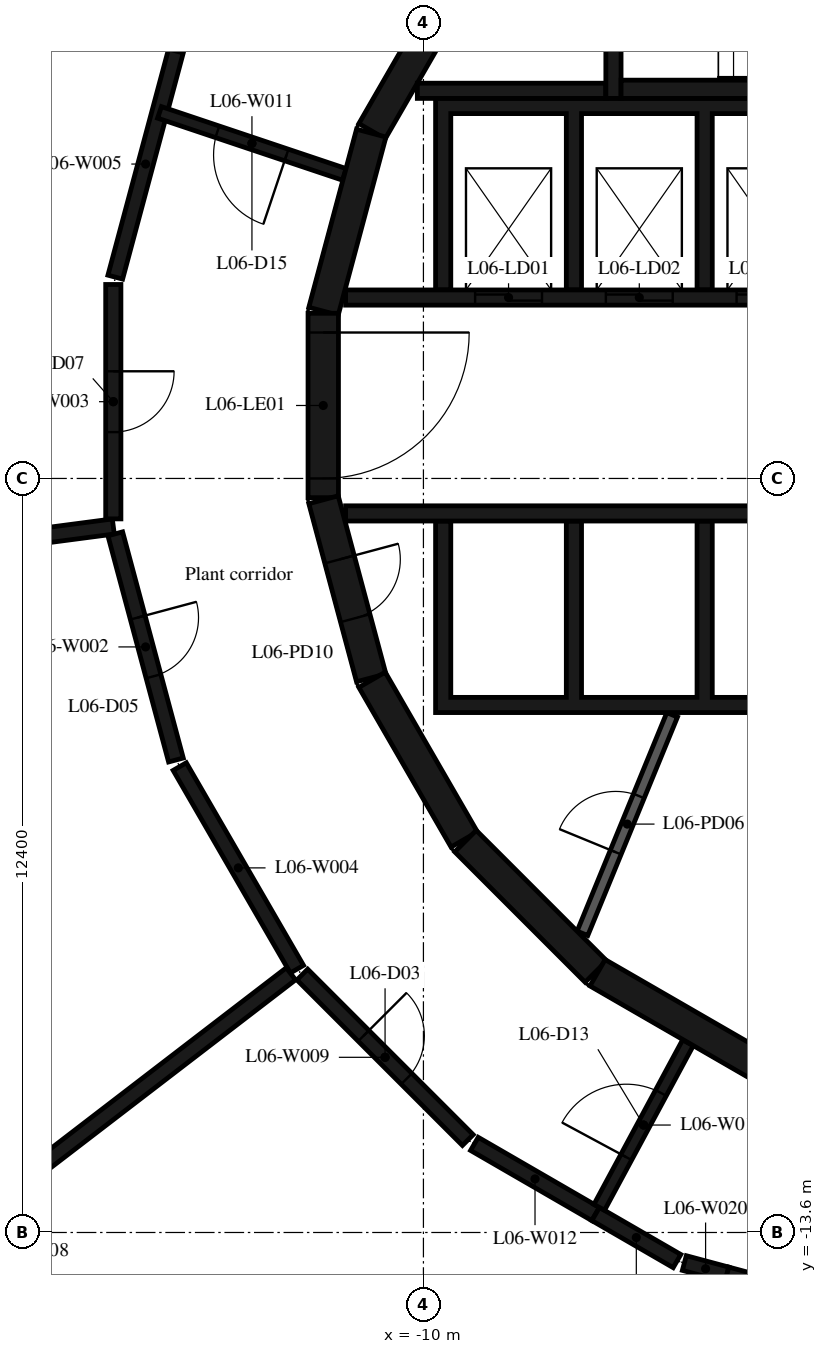
"""IFC4 building model, lengths in metres.
Left out: names, types, materials, properties, quantities, classifications, styles, units other than length and angle.
Written with IfcOpenShell. Run it as: python <this file> out.ifc"""

import sys

from ifc_helpers import new_model, si_unit, direction, frame, frame_2d, origin, place, context, subcontext, project, spatial, polyline, rectangle, outline, extrude, element, fill, save


model = new_model("IFC4")
c1 = context("Model", 3, precision=1e-05, world=origin(), true_north=direction((0.0, 1.0)))
c2 = subcontext(c1, "Body", "Model", "MODEL_VIEW")
j1 = project(units=[si_unit("LENGTHUNIT", "METRE"), si_unit("PLANEANGLEUNIT", "RADIAN")], contexts=[c1])
p1 = place(None, origin())
s1 = spatial("IfcSite", under=j1, at=p1, CompositionType="ELEMENT")
p2 = place(p1, origin())
s2 = spatial("IfcBuilding", under=s1, at=p2, CompositionType="ELEMENT")
p3 = place(p2, frame((0.0, 0.0, 33.0)))
s3 = spatial("IfcBuildingStorey", under=s2, at=p3, CompositionType="ELEMENT", Elevation=33.0)
for number, where, z_axis, x_axis in (
    (1, (-9.329, 7.137, 0.0), (0.0, 0.0, 1.0), (-0.5, -0.866, 0.0)),
    (2, (-10.858, 4.479, 0.0), (0.0, 0.0, 1.0), (-0.259, -0.966, 0.0)),
):
    element("IfcWall", number, at=place(p3, frame(where, z_axis=z_axis, x_axis=x_axis)), inside=s3, PredefinedType="SHEAR", context=c2, shape_type="SweptSolid", body=[
        extrude(rectangle(XDim=3.033, YDim=0.5, at=frame_2d((1.516, 0.0))), origin(), (0.0, 0.0, 1.0), 4.95),
    ])
p4 = place(p3, frame((-11.647, 1.516, 0.0), z_axis=(0.0, 0.0, 1.0), x_axis=(0.0, -1.0, 0.0)))
e3 = element("IfcWall", 3, at=p4, inside=s3, PredefinedType="SHEAR", context=c2, shape_type="SweptSolid", body=[
    extrude(rectangle(XDim=3.033, YDim=0.5, at=frame_2d((1.516, 0.0))), origin(), (0.0, 0.0, 1.0), 4.95),
])
p5 = place(p4, frame((0.316, 0.0, 0.0)))
e4 = element("IfcOpeningElement", 4, at=p5, cuts=e3, PredefinedType="OPENING", context=c2, shape_type="SweptSolid", body=[
    extrude(rectangle(XDim=2.4, YDim=2.1, at=frame_2d((1.2, 1.05))), frame((0.0, 0.26, 0.0), z_axis=(0.0, -1.0, 0.0), x_axis=(1.0, 0.0, 0.0)), (0.0, 0.0, 1.0), 0.52),
])
p6 = place(p3, frame((-11.643, -1.55, 0.0), z_axis=(0.0, 0.0, 1.0), x_axis=(0.258734743916, -0.965948410781, 0.0)))
e5 = element("IfcWall", 5, at=p6, inside=s3, PredefinedType="SHEAR", context=c2, shape_type="SweptSolid", body=[
    extrude(rectangle(XDim=3.033, YDim=0.5, at=frame_2d((1.516, 0.0))), origin(), (0.0, 0.0, 1.0), 4.95),
])
p7 = place(p6, frame((1.016, 0.0, 0.0)))
e6 = element("IfcOpeningElement", 6, at=p7, cuts=e5, PredefinedType="OPENING", context=c2, shape_type="SweptSolid", body=[
    extrude(rectangle(XDim=1.0, YDim=2.4, at=frame_2d((0.5, 1.2))), frame((0.0, 0.26, 0.0), z_axis=(0.0, -1.0, 0.0), x_axis=(1.0, 0.0, 0.0)), (0.0, 0.0, 1.0), 0.52),
])
p8 = place(p3, frame((-10.845, -4.51, 0.0), z_axis=(0.0, 0.0, 1.0), x_axis=(0.500087131594, -0.865975092491, 0.0)))
e7 = element("IfcWall", 7, at=p8, inside=s3, PredefinedType="SHEAR", context=c2, shape_type="SweptSolid", body=[
    extrude(rectangle(XDim=3.033, YDim=0.5, at=frame_2d((1.516, 0.0))), origin(), (0.0, 0.0, 1.0), 4.95),
])
p9 = place(p3, frame((-9.308, -7.164, 0.0), z_axis=(0.0, 0.0, 1.0), x_axis=(0.707106781187, -0.707106781187, 0.0)))
e8 = element("IfcWall", 8, at=p9, inside=s3, PredefinedType="SHEAR", context=c2, shape_type="SweptSolid", body=[
    extrude(rectangle(XDim=3.032, YDim=0.5, at=frame_2d((1.516, 0.0))), origin(), (0.0, 0.0, 1.0), 4.95),
])
p10 = place(p3, frame((-7.137, -9.329, 0.0), z_axis=(0.0, 0.0, 1.0), x_axis=(0.865975092491, -0.500087131594, 0.0)))
e9 = element("IfcWall", 9, at=p10, inside=s3, PredefinedType="SHEAR", context=c2, shape_type="SweptSolid", body=[
    extrude(rectangle(XDim=3.033, YDim=0.5, at=frame_2d((1.516, 0.0))), origin(), (0.0, 0.0, 1.0), 4.95),
])
p11 = place(p3, frame((-6.75, 5.2, 0.0), z_axis=(0.0, 0.0, 1.0), x_axis=(1.0, 0.0, 0.0)))
e10 = element("IfcWall", 10, at=p11, inside=s3, PredefinedType="SHEAR", context=c2, shape_type="SweptSolid", body=[
    extrude(rectangle(XDim=6.75, YDim=0.3, at=frame_2d((3.375, 0.0))), origin(), (0.0, 0.0, 1.0), 4.95),
])
p12 = place(p3, frame((-6.875, 8.97, 0.0), z_axis=(0.0, 0.0, 1.0), x_axis=(0.0, -1.0, 0.0)))
e11 = element("IfcWall", 11, at=p12, inside=s3, PredefinedType="SHEAR", context=c2, shape_type="SweptSolid", body=[
    extrude(rectangle(XDim=3.92, YDim=0.25, at=frame_2d((1.96, 0.0))), origin(), (0.0, 0.0, 1.0), 4.95),
])
p13 = place(p12, frame((1.61, 0.0, 0.0)))
e12 = element("IfcOpeningElement", 12, at=p13, cuts=e11, PredefinedType="OPENING", context=c2, shape_type="SweptSolid", body=[
    extrude(rectangle(XDim=1.2, YDim=2.1, at=frame_2d((0.6, 1.05))), frame((0.0, 0.135, 0.0), z_axis=(0.0, -1.0, 0.0), x_axis=(1.0, 0.0, 0.0)), (0.0, 0.0, 1.0), 0.27),
])
p14 = place(p3, frame((-7.0, 5.175, 0.0), z_axis=(0.0, 0.0, 1.0), x_axis=(-1.0, 0.0, 0.0)))
e13 = element("IfcWall", 13, at=p14, inside=s3, PredefinedType="SHEAR", context=c2, shape_type="SweptSolid", body=[
    extrude(rectangle(XDim=3.1, YDim=0.25, at=frame_2d((1.55, 0.0))), origin(), (0.0, 0.0, 1.0), 4.95),
])
p15 = place(p3, origin())
e14 = element("IfcWall", 14, at=p15, inside=s3, PredefinedType="SHEAR", context=c2, shape_type="SweptSolid", body=[
    extrude(outline(polyline([(-9.55, 4.8), (-7.65, 4.8), (-7.65, 1.9), (-7.4, 1.9), (-7.4, 4.8), (-5.5, 4.8), (-5.5, 1.9), (-5.25, 1.9), (-5.25, 4.8), (-3.35, 4.8), (-3.35, 1.9), (-3.1, 1.9), (-3.1, 4.8), (-1.2, 4.8), (-1.2, 1.9), (-0.95, 1.9), (-0.95, 4.8), (3.1, 4.8), (3.1, 1.9), (3.35, 1.9), (3.35, 4.8), (5.25, 4.8), (5.25, 1.9), (5.5, 1.9), (5.5, 4.8), (7.4, 4.8), (7.4, 1.9), (7.65, 1.9), (7.65, 4.8), (9.55, 4.8), (9.55, 1.9), (9.8, 1.9), (9.8, 4.8), (9.8, 5.05), (-9.8, 5.05), (-9.8, 4.8), (-9.8, 1.9), (-9.55, 1.9), (-9.55, 4.8)])), origin(), (0.0, 0.0, 1.0), 4.95),
])
p16 = place(p3, origin())
e15 = element("IfcWall", 15, at=p16, inside=s3, PredefinedType="SHEAR", context=c2, shape_type="SweptSolid", body=[
    extrude(outline(polyline([(9.8, -5.05), (9.8, -4.8), (9.8, -1.9), (9.55, -1.9), (9.55, -4.8), (7.65, -4.8), (7.65, -1.9), (7.4, -1.9), (7.4, -4.8), (5.5, -4.8), (5.5, -1.9), (5.25, -1.9), (5.25, -4.8), (3.35, -4.8), (3.35, -1.9), (3.1, -1.9), (3.1, -4.8), (1.2, -4.8), (1.2, -1.9), (0.95, -1.9), (0.95, -4.8), (-0.95, -4.8), (-0.95, -1.9), (-1.2, -1.9), (-1.2, -4.8), (-5.25, -4.8), (-5.25, -1.9), (-5.5, -1.9), (-5.5, -4.8), (-7.4, -4.8), (-7.4, -1.9), (-7.65, -1.9), (-7.65, -4.8), (-9.55, -4.8), (-9.55, -1.9), (-9.8, -1.9), (-9.8, -4.8), (-9.8, -5.05), (9.8, -5.05)])), origin(), (0.0, 0.0, 1.0), 4.95),
])
p17 = place(p3, frame((-11.28, 1.775, 0.0), z_axis=(0.0, 0.0, 1.0), x_axis=(1.0, 0.0, 0.0)))
e16 = element("IfcWall", 16, at=p17, inside=s3, PredefinedType="SHEAR", context=c2, shape_type="SweptSolid", body=[
    extrude(rectangle(XDim=14.38, YDim=0.25, at=frame_2d((7.19, 0.0))), origin(), (0.0, 0.0, 1.0), 4.95),
])
p18 = place(p17, frame((2.13, 0.0, 0.0)))
e17 = element("IfcOpeningElement", 17, at=p18, cuts=e16, PredefinedType="OPENING", context=c2, shape_type="SweptSolid", body=[
    extrude(rectangle(XDim=1.1, YDim=2.1, at=frame_2d((0.55, 1.05))), frame((0.0, 0.135, 0.0), z_axis=(0.0, -1.0, 0.0), x_axis=(1.0, 0.0, 0.0)), (0.0, 0.0, 1.0), 0.27),
])
p19 = place(p17, frame((4.28, 0.0, 0.0)))
e18 = element("IfcOpeningElement", 18, at=p19, cuts=e16, PredefinedType="OPENING", context=c2, shape_type="SweptSolid", body=[
    extrude(rectangle(XDim=1.1, YDim=2.1, at=frame_2d((0.55, 1.05))), frame((0.0, 0.135, 0.0), z_axis=(0.0, -1.0, 0.0), x_axis=(1.0, 0.0, 0.0)), (0.0, 0.0, 1.0), 0.27),
])
p20 = place(p17, frame((6.43, 0.0, 0.0)))
e19 = element("IfcOpeningElement", 19, at=p20, cuts=e16, PredefinedType="OPENING", context=c2, shape_type="SweptSolid", body=[
    extrude(rectangle(XDim=1.1, YDim=2.1, at=frame_2d((0.55, 1.05))), frame((0.0, 0.135, 0.0), z_axis=(0.0, -1.0, 0.0), x_axis=(1.0, 0.0, 0.0)), (0.0, 0.0, 1.0), 0.27),
])
p21 = place(p17, frame((8.58, 0.0, 0.0)))
e20 = element("IfcOpeningElement", 20, at=p21, cuts=e16, PredefinedType="OPENING", context=c2, shape_type="SweptSolid", body=[
    extrude(rectangle(XDim=1.1, YDim=2.1, at=frame_2d((0.55, 1.05))), frame((0.0, 0.135, 0.0), z_axis=(0.0, -1.0, 0.0), x_axis=(1.0, 0.0, 0.0)), (0.0, 0.0, 1.0), 0.27),
])
p22 = place(p17, frame((11.855, 0.0, 0.0)))
e21 = element("IfcOpeningElement", 21, at=p22, cuts=e16, PredefinedType="OPENING", context=c2, shape_type="SweptSolid", body=[
    extrude(rectangle(XDim=1.0, YDim=2.4, at=frame_2d((0.5, 1.2))), frame((0.0, 0.135, 0.0), z_axis=(0.0, -1.0, 0.0), x_axis=(1.0, 0.0, 0.0)), (0.0, 0.0, 1.0), 0.27),
])
p23 = place(p3, frame((-11.28, -1.775, 0.0), z_axis=(0.0, 0.0, 1.0), x_axis=(1.0, 0.0, 0.0)))
e22 = element("IfcWall", 22, at=p23, inside=s3, PredefinedType="SHEAR", context=c2, shape_type="SweptSolid", body=[
    extrude(rectangle(XDim=14.38, YDim=0.25, at=frame_2d((7.19, 0.0))), origin(), (0.0, 0.0, 1.0), 4.95),
])
p24 = place(p23, frame((7.555, 0.0, 0.0)))
e23 = element("IfcOpeningElement", 23, at=p24, cuts=e22, PredefinedType="OPENING", context=c2, shape_type="SweptSolid", body=[
    extrude(rectangle(XDim=1.0, YDim=2.4, at=frame_2d((0.5, 1.2))), frame((0.0, 0.135, 0.0), z_axis=(0.0, -1.0, 0.0), x_axis=(1.0, 0.0, 0.0)), (0.0, 0.0, 1.0), 0.27),
])
p25 = place(p23, frame((10.78, 0.0, 0.0)))
e24 = element("IfcOpeningElement", 24, at=p25, cuts=e22, PredefinedType="OPENING", context=c2, shape_type="SweptSolid", body=[
    extrude(rectangle(XDim=1.0, YDim=2.4, at=frame_2d((0.5, 1.2))), frame((0.0, 0.135, 0.0), z_axis=(0.0, -1.0, 0.0), x_axis=(1.0, 0.0, 0.0)), (0.0, 0.0, 1.0), 0.27),
])
p26 = place(p23, frame((12.93, 0.0, 0.0)))
e25 = element("IfcOpeningElement", 25, at=p26, cuts=e22, PredefinedType="OPENING", context=c2, shape_type="SweptSolid", body=[
    extrude(rectangle(XDim=1.0, YDim=2.4, at=frame_2d((0.5, 1.2))), frame((0.0, 0.135, 0.0), z_axis=(0.0, -1.0, 0.0), x_axis=(1.0, 0.0, 0.0)), (0.0, 0.0, 1.0), 0.27),
])
p27 = place(p3, frame((-7.385, -8.681, 0.0), z_axis=(0.0, 0.0, 1.0), x_axis=(0.379804590409, 0.925066739811, 0.0)))
e26 = element("IfcWall", 26, at=p27, inside=s3, PredefinedType="PARTITIONING", context=c2, shape_type="SweptSolid", body=[
    extrude(rectangle(XDim=3.885, YDim=0.19, at=frame_2d((1.942, 0.0))), origin(), (0.0, 0.0, 1.0), 4.95),
])
p28 = place(p27, frame((1.443, 0.0, 0.0)))
e27 = element("IfcOpeningElement", 27, at=p28, cuts=e26, PredefinedType="OPENING", context=c2, shape_type="SweptSolid", body=[
    extrude(rectangle(XDim=1.0, YDim=2.4, at=frame_2d((0.5, 1.2))), frame((0.0, 0.105, 0.0), z_axis=(0.0, -1.0, 0.0), x_axis=(1.0, 0.0, 0.0)), (0.0, 0.0, 1.0), 0.21),
])
p29 = place(p3, frame((-15.1, -1.99, 0.0), z_axis=(0.0, 0.0, 1.0), x_axis=(-0.991465922176, -0.130366119689, 0.0)))
e28 = element("IfcWall", 28, at=p29, inside=s3, PredefinedType="PARTITIONING", context=c2, shape_type="SweptSolid", body=[
    extrude(rectangle(XDim=9.431, YDim=0.25, at=frame_2d((4.716, 0.0))), origin(), (0.0, 0.0, 1.0), 4.95),
])
p30 = place(p3, frame((-15.068, -2.111, 0.0), z_axis=(0.0, 0.0, 1.0), x_axis=(0.259059323171, -0.965861411942, 0.0)))
e29 = element("IfcWall", 29, at=p30, inside=s3, PredefinedType="PARTITIONING", context=c2, shape_type="SweptSolid", body=[
    extrude(rectangle(XDim=3.851, YDim=0.25, at=frame_2d((1.925, 0.0))), origin(), (0.0, 0.0, 1.0), 4.95),
])
p31 = place(p30, frame((1.425, 0.0, 0.0)))
e30 = element("IfcOpeningElement", 30, at=p31, cuts=e29, PredefinedType="OPENING", context=c2, shape_type="SweptSolid", body=[
    extrude(rectangle(XDim=1.0, YDim=2.1, at=frame_2d((0.5, 1.05))), frame((0.0, 0.135, 0.0), z_axis=(0.0, -1.0, 0.0), x_axis=(1.0, 0.0, 0.0)), (0.0, 0.0, 1.0), 0.27),
])
p32 = place(p3, frame((-15.1, 1.99, 0.0), z_axis=(0.0, 0.0, 1.0), x_axis=(0.0, -1.0, 0.0)))
e31 = element("IfcWall", 31, at=p32, inside=s3, PredefinedType="PARTITIONING", context=c2, shape_type="SweptSolid", body=[
    extrude(rectangle(XDim=3.855, YDim=0.25, at=frame_2d((1.927, 0.0))), origin(), (0.0, 0.0, 1.0), 4.95),
])
p33 = place(p32, frame((1.427, 0.0, 0.0)))
e32 = element("IfcOpeningElement", 32, at=p33, cuts=e31, PredefinedType="OPENING", context=c2, shape_type="SweptSolid", body=[
    extrude(rectangle(XDim=1.0, YDim=2.1, at=frame_2d((0.5, 1.05))), frame((0.0, 0.135, 0.0), z_axis=(0.0, -1.0, 0.0), x_axis=(1.0, 0.0, 0.0)), (0.0, 0.0, 1.0), 0.27),
])
p34 = place(p3, frame((-14.007, -5.938, 0.0), z_axis=(0.0, 0.0, 1.0), x_axis=(0.500708693508, -0.865615852585, 0.0)))
e33 = element("IfcWall", 33, at=p34, inside=s3, PredefinedType="PARTITIONING", context=c2, shape_type="SweptSolid", body=[
    extrude(rectangle(XDim=3.849, YDim=0.25, at=frame_2d((1.925, 0.0))), origin(), (0.0, 0.0, 1.0), 4.95),
])
p35 = place(p3, frame((-14.07, 5.83, 0.0), z_axis=(0.0, 0.0, 1.0), x_axis=(-0.259059323171, -0.965861411942, 0.0)))
e34 = element("IfcWall", 34, at=p35, inside=s3, PredefinedType="PARTITIONING", context=c2, shape_type="SweptSolid", body=[
    extrude(rectangle(XDim=3.851, YDim=0.25, at=frame_2d((1.925, 0.0))), origin(), (0.0, 0.0, 1.0), 4.95),
])
p36 = place(p3, frame((-12.179, -9.346, 0.0), z_axis=(0.0, 0.0, 1.0), x_axis=(-0.793242531183, -0.608905811043, 0.0)))
e35 = element("IfcWall", 35, at=p36, inside=s3, PredefinedType="PARTITIONING", context=c2, shape_type="SweptSolid", body=[
    extrude(rectangle(XDim=14.986, YDim=0.25, at=frame_2d((7.493, 0.0))), origin(), (0.0, 0.0, 1.0), 4.95),
])
p37 = place(p3, frame((-11.992, -9.358, 0.0), z_axis=(0.0, 0.0, 1.0), x_axis=(0.707106781187, -0.707106781187, 0.0)))
e36 = element("IfcWall", 36, at=p37, inside=s3, PredefinedType="PARTITIONING", context=c2, shape_type="SweptSolid", body=[
    extrude(rectangle(XDim=3.849, YDim=0.25, at=frame_2d((1.925, 0.0))), origin(), (0.0, 0.0, 1.0), 4.95),
])
p38 = place(p37, frame((1.425, 0.0, 0.0)))
e37 = element("IfcOpeningElement", 37, at=p38, cuts=e36, PredefinedType="OPENING", context=c2, shape_type="SweptSolid", body=[
    extrude(rectangle(XDim=1.0, YDim=2.1, at=frame_2d((0.5, 1.05))), frame((0.0, 0.135, 0.0), z_axis=(0.0, -1.0, 0.0), x_axis=(1.0, 0.0, 0.0)), (0.0, 0.0, 1.0), 0.27),
])
p39 = place(p3, frame((-11.3, 3.8, 0.0), z_axis=(0.0, 0.0, 1.0), x_axis=(-0.94805712629, 0.318100118345, 0.0)))
e38 = element("IfcWall", 38, at=p39, inside=s3, PredefinedType="PARTITIONING", context=c2, shape_type="SweptSolid", body=[
    extrude(rectangle(XDim=3.207, YDim=0.2, at=frame_2d((1.603, 0.0))), origin(), (0.0, 0.0, 1.0), 4.95),
])
p40 = place(p39, frame((1.003, 0.0, 0.0)))
e39 = element("IfcOpeningElement", 39, at=p40, cuts=e38, PredefinedType="OPENING", context=c2, shape_type="SweptSolid", body=[
    extrude(rectangle(XDim=1.2, YDim=2.1, at=frame_2d((0.6, 1.05))), frame((0.0, 0.11, 0.0), z_axis=(0.0, -1.0, 0.0), x_axis=(1.0, 0.0, 0.0)), (0.0, 0.0, 1.0), 0.22),
])
p41 = place(p3, frame((-9.162, -12.143, 0.0), z_axis=(0.0, 0.0, 1.0), x_axis=(0.865576208327, -0.500777223502, 0.0)))
e40 = element("IfcWall", 40, at=p41, inside=s3, PredefinedType="PARTITIONING", context=c2, shape_type="SweptSolid", body=[
    extrude(rectangle(XDim=2.303, YDim=0.25, at=frame_2d((1.152, 0.0))), origin(), (0.0, 0.0, 1.0), 4.95),
])
p42 = place(p3, frame((-7.168, -13.296, 0.0), z_axis=(0.0, 0.0, 1.0), x_axis=(0.865606471313, -0.500724911325, 0.0)))
e41 = element("IfcWall", 41, at=p42, inside=s3, PredefinedType="PARTITIONING", context=c2, shape_type="SweptSolid", body=[
    extrude(rectangle(XDim=1.546, YDim=0.25, at=frame_2d((0.773, 0.0))), origin(), (0.0, 0.0, 1.0), 4.95),
])
p43 = place(p3, frame((-7.109, -13.186, 0.0), z_axis=(0.0, 0.0, 1.0), x_axis=(0.474511788195, 0.880249148176, 0.0)))
e42 = element("IfcWall", 42, at=p43, inside=s3, PredefinedType="PARTITIONING", context=c2, shape_type="SweptSolid", body=[
    extrude(rectangle(XDim=3.074, YDim=0.2, at=frame_2d((1.537, 0.0))), origin(), (0.0, 0.0, 1.0), 4.95),
])
p44 = place(p43, frame((0.937, 0.0, 0.0)))
e43 = element("IfcOpeningElement", 43, at=p44, cuts=e42, PredefinedType="OPENING", context=c2, shape_type="SweptSolid", body=[
    extrude(rectangle(XDim=1.2, YDim=2.1, at=frame_2d((0.6, 1.05))), frame((0.0, 0.11, 0.0), z_axis=(0.0, -1.0, 0.0), x_axis=(1.0, 0.0, 0.0)), (0.0, 0.0, 1.0), 0.22),
])
p45 = place(p3, frame((-5.709, -14.102, 0.0), z_axis=(0.0, 0.0, 1.0), x_axis=(0.965791356005, -0.25932037457, 0.0)))
e44 = element("IfcWall", 44, at=p45, inside=s3, PredefinedType="PARTITIONING", context=c2, shape_type="SweptSolid", body=[
    extrude(rectangle(XDim=0.724, YDim=0.25, at=frame_2d((0.362, 0.0))), origin(), (0.0, 0.0, 1.0), 4.95),
])
p46 = place(p3, frame((-5.01, -14.29, 0.0), z_axis=(0.0, 0.0, 1.0), x_axis=(0.965858087727, -0.259071716659, 0.0)))
e45 = element("IfcWall", 45, at=p46, inside=s3, PredefinedType="PARTITIONING", context=c2, shape_type="SweptSolid", body=[
    extrude(rectangle(XDim=3.127, YDim=0.25, at=frame_2d((1.563, 0.0))), origin(), (0.0, 0.0, 1.0), 4.95),
])
p47 = place(p5, origin())
e46 = element("IfcDoor", 46, at=p47, inside=s3, OperationType="DOUBLE_DOOR_SINGLE_SWING", PredefinedType="DOOR", context=c2, shape_type="SweptSolid", body=[
    extrude(rectangle(XDim=2.4, YDim=2.1, at=frame_2d((1.2, 1.05))), frame((0.0, 0.025, 0.0), z_axis=(0.0, -1.0, 0.0), x_axis=(1.0, 0.0, 0.0)), (0.0, 0.0, 1.0), 0.05),
])
fill(e4, e46)
p48 = place(p18, origin())
e47 = element("IfcDoor", 47, at=p48, inside=s3, OperationType="DOUBLE_DOOR_SLIDING", PredefinedType="DOOR", context=c2, shape_type="SweptSolid", body=[
    extrude(rectangle(XDim=1.1, YDim=2.1, at=frame_2d((0.55, 1.05))), frame((0.0, 0.025, 0.0), z_axis=(0.0, -1.0, 0.0), x_axis=(1.0, 0.0, 0.0)), (0.0, 0.0, 1.0), 0.05),
])
fill(e17, e47)
p49 = place(p19, origin())
e48 = element("IfcDoor", 48, at=p49, inside=s3, OperationType="DOUBLE_DOOR_SLIDING", PredefinedType="DOOR", context=c2, shape_type="SweptSolid", body=[
    extrude(rectangle(XDim=1.1, YDim=2.1, at=frame_2d((0.55, 1.05))), frame((0.0, 0.025, 0.0), z_axis=(0.0, -1.0, 0.0), x_axis=(1.0, 0.0, 0.0)), (0.0, 0.0, 1.0), 0.05),
])
fill(e18, e48)
p50 = place(p20, origin())
e49 = element("IfcDoor", 49, at=p50, inside=s3, OperationType="DOUBLE_DOOR_SLIDING", PredefinedType="DOOR", context=c2, shape_type="SweptSolid", body=[
    extrude(rectangle(XDim=1.1, YDim=2.1, at=frame_2d((0.55, 1.05))), frame((0.0, 0.025, 0.0), z_axis=(0.0, -1.0, 0.0), x_axis=(1.0, 0.0, 0.0)), (0.0, 0.0, 1.0), 0.05),
])
fill(e19, e49)
p51 = place(p28, origin())
e50 = element("IfcDoor", 50, at=p51, inside=s3, OperationType="SINGLE_SWING_LEFT", PredefinedType="DOOR", context=c2, shape_type="SweptSolid", body=[
    extrude(rectangle(XDim=1.0, YDim=2.4, at=frame_2d((0.5, 1.2))), frame((0.0, 0.025, 0.0), z_axis=(0.0, -1.0, 0.0), x_axis=(1.0, 0.0, 0.0)), (0.0, 0.0, 1.0), 0.05),
])
fill(e27, e50)
p52 = place(p7, origin())
e51 = element("IfcDoor", 51, at=p52, inside=s3, OperationType="SINGLE_SWING_LEFT", PredefinedType="DOOR", context=c2, shape_type="SweptSolid", body=[
    extrude(rectangle(XDim=1.0, YDim=2.4, at=frame_2d((0.5, 1.2))), frame((0.0, 0.025, 0.0), z_axis=(0.0, -1.0, 0.0), x_axis=(1.0, 0.0, 0.0)), (0.0, 0.0, 1.0), 0.05),
])
fill(e6, e51)
p53 = place(p38, origin())
e52 = element("IfcDoor", 52, at=p53, inside=s3, OperationType="SINGLE_SWING_LEFT", PredefinedType="DOOR", context=c2, shape_type="SweptSolid", body=[
    extrude(rectangle(XDim=1.0, YDim=2.1, at=frame_2d((0.5, 1.05))), frame((0.0, 0.025, 0.0), z_axis=(0.0, -1.0, 0.0), x_axis=(1.0, 0.0, 0.0)), (0.0, 0.0, 1.0), 0.05),
])
fill(e37, e52)
p54 = place(p31, origin())
e53 = element("IfcDoor", 53, at=p54, inside=s3, OperationType="SINGLE_SWING_LEFT", PredefinedType="DOOR", context=c2, shape_type="SweptSolid", body=[
    extrude(rectangle(XDim=1.0, YDim=2.1, at=frame_2d((0.5, 1.05))), frame((0.0, 0.025, 0.0), z_axis=(0.0, -1.0, 0.0), x_axis=(1.0, 0.0, 0.0)), (0.0, 0.0, 1.0), 0.05),
])
fill(e30, e53)
p55 = place(p33, origin())
e54 = element("IfcDoor", 54, at=p55, inside=s3, OperationType="SINGLE_SWING_LEFT", PredefinedType="DOOR", context=c2, shape_type="SweptSolid", body=[
    extrude(rectangle(XDim=1.0, YDim=2.1, at=frame_2d((0.5, 1.05))), frame((0.0, 0.025, 0.0), z_axis=(0.0, -1.0, 0.0), x_axis=(1.0, 0.0, 0.0)), (0.0, 0.0, 1.0), 0.05),
])
fill(e32, e54)
p56 = place(p44, origin())
e55 = element("IfcDoor", 55, at=p56, inside=s3, OperationType="SINGLE_SWING_LEFT", PredefinedType="DOOR", context=c2, shape_type="SweptSolid", body=[
    extrude(rectangle(XDim=1.2, YDim=2.1, at=frame_2d((0.6, 1.05))), frame((0.0, 0.025, 0.0), z_axis=(0.0, -1.0, 0.0), x_axis=(1.0, 0.0, 0.0)), (0.0, 0.0, 1.0), 0.05),
])
fill(e43, e55)
p57 = place(p40, origin())
e56 = element("IfcDoor", 56, at=p57, inside=s3, OperationType="SINGLE_SWING_LEFT", PredefinedType="DOOR", context=c2, shape_type="SweptSolid", body=[
    extrude(rectangle(XDim=1.2, YDim=2.1, at=frame_2d((0.6, 1.05))), frame((0.0, 0.025, 0.0), z_axis=(0.0, -1.0, 0.0), x_axis=(1.0, 0.0, 0.0)), (0.0, 0.0, 1.0), 0.05),
])
fill(e39, e56)
save(model, sys.argv[1])
